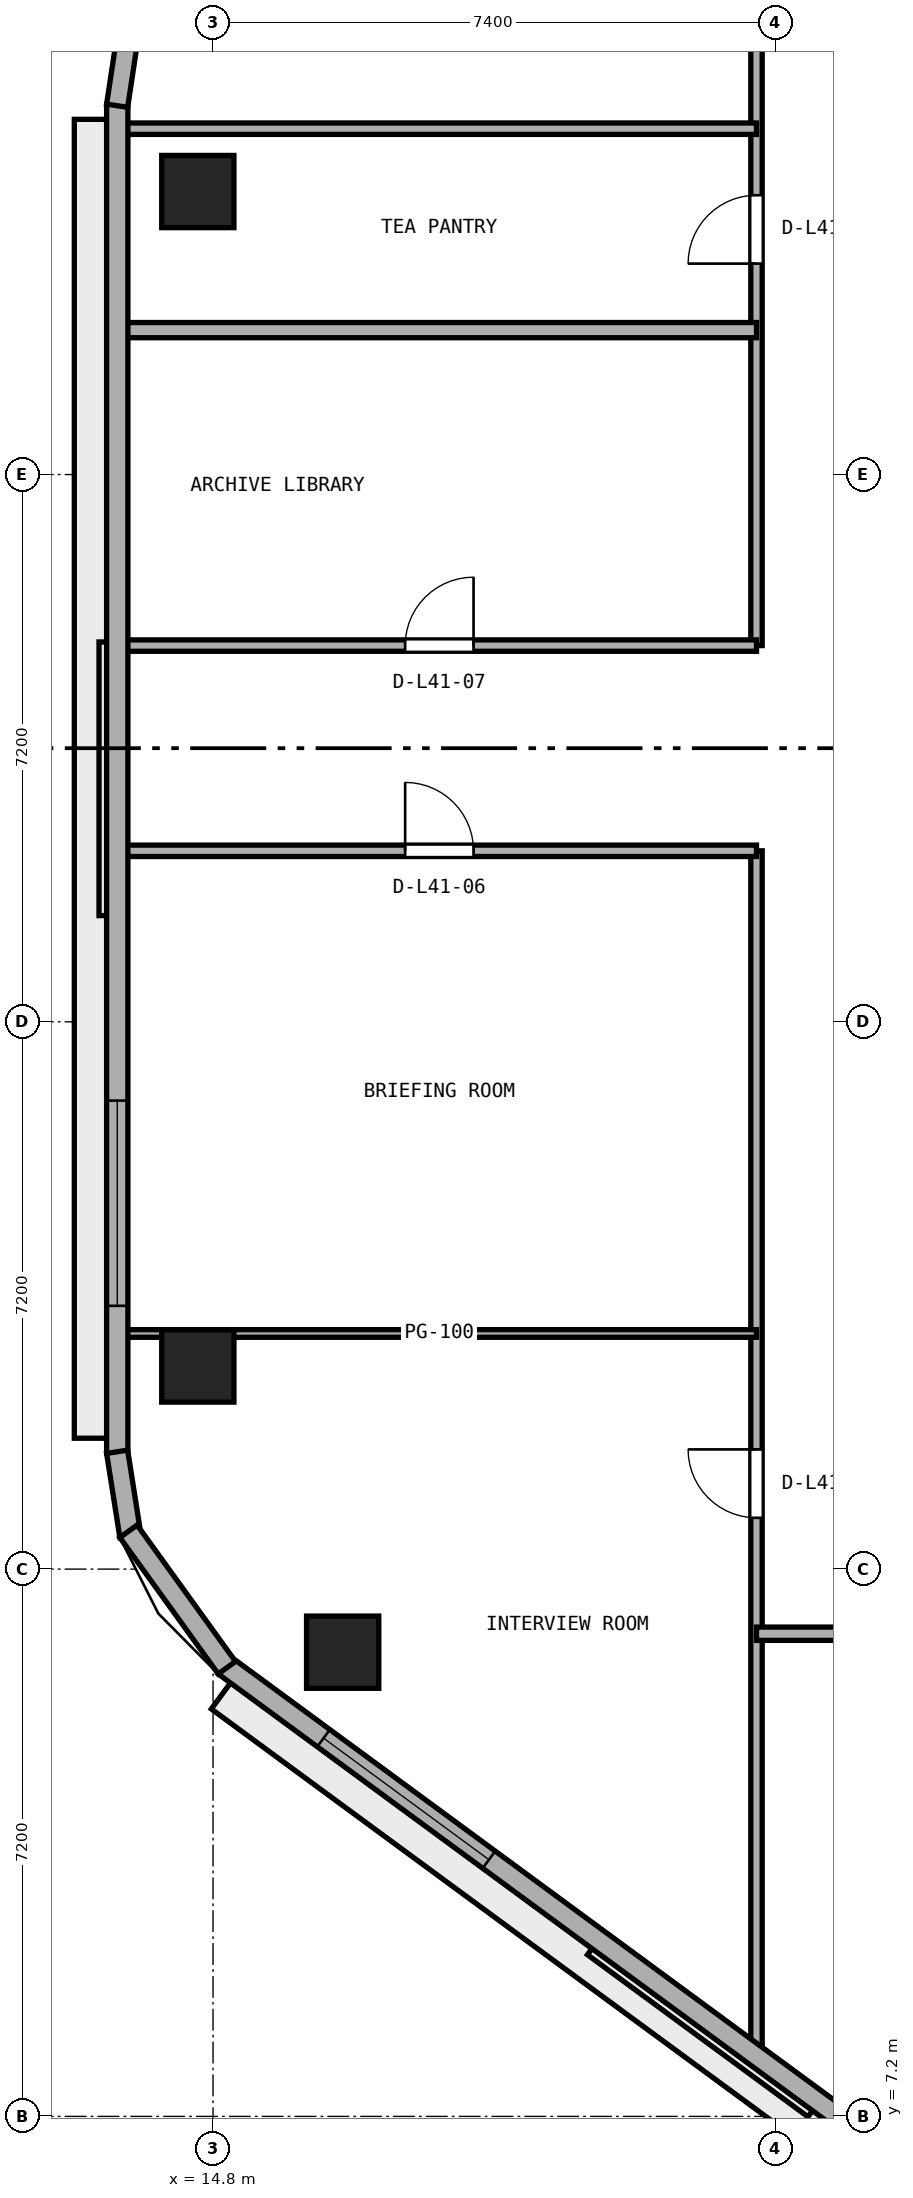
"""IFC4 building model, lengths in metres.
Left out: names, types, materials, properties, quantities, classifications, styles, units other than length and angle.
Written with IfcOpenShell. Run it as: python <this file> out.ifc"""

import sys

from ifc_helpers import new_model, si_unit, direction, frame, frame_2d, origin, origin_2d, place, context, subcontext, project, spatial, rectangle, extrude, element, fill, save


model = new_model("IFC4")
c1 = context("Model", 3, precision=1e-05, world=origin(), true_north=direction((0.0, 1.0)))
c2 = subcontext(c1, "Body", "Model", "MODEL_VIEW")
j1 = project(units=[si_unit("LENGTHUNIT", "METRE"), si_unit("PLANEANGLEUNIT", "RADIAN")], contexts=[c1])
p1 = place(None, origin())
s1 = spatial("IfcSite", under=j1, at=p1, CompositionType="ELEMENT")
p2 = place(p1, origin())
s2 = spatial("IfcBuilding", under=s1, at=p2, CompositionType="ELEMENT")
p3 = place(p2, frame((0.0, 0.0, 163.0)))
s3 = spatial("IfcBuildingStorey", under=s2, at=p3, CompositionType="ELEMENT", Elevation=163.0)
for number, where, z_axis, x_axis in (
    (1, (14.6, 32.523, 0.0), (0.0, 0.0, 1.0), (1.0, 0.0, 0.0)),
    (2, (14.6, 17.072, 0.0), (0.0, 0.0, 1.0), (1.0, 0.0, 0.0)),
    (3, (16.505, 13.307, 0.0), (0.0, 0.0, 1.0), (1.0, 0.0, 0.0)),
):
    element("IfcColumn", number, at=place(p3, frame(where, z_axis=z_axis, x_axis=x_axis)), inside=s3, PredefinedType="COLUMN", context=c2, shape_type="SweptSolid", body=[
        extrude(rectangle(XDim=0.95, YDim=0.95, at=origin_2d()), origin(), (0.0, 0.0, 1.0), 3.8),
    ])
p4 = place(p3, frame((21.95, 7.957, 0.0), z_axis=(0.0, 0.0, 1.0), x_axis=(0.0, 1.0, 0.0)))
e4 = element("IfcWall", 4, at=p4, inside=s3, PredefinedType="PARTITIONING", context=c2, shape_type="SweptSolid", body=[
    extrude(rectangle(XDim=15.894, YDim=0.15, at=frame_2d((7.947, 0.0))), origin(), (0.0, 0.0, 1.0), 3.54),
])
p5 = place(p4, frame((7.118, 0.0, 0.0)))
e5 = element("IfcOpeningElement", 5, at=p5, cuts=e4, PredefinedType="OPENING", context=c2, shape_type="SweptSolid", body=[
    extrude(rectangle(XDim=0.9, YDim=2.1, at=frame_2d((0.45, 1.05))), frame((0.0, 0.085, 0.0), z_axis=(0.0, -1.0, 0.0), x_axis=(1.0, 0.0, 0.0)), (0.0, 0.0, 1.0), 0.17),
])
p6 = place(p3, frame((21.95, 26.55, 0.0), z_axis=(0.0, 0.0, 1.0), x_axis=(0.0, 1.0, 0.0)))
e6 = element("IfcWall", 6, at=p6, inside=s3, PredefinedType="PARTITIONING", context=c2, shape_type="SweptSolid", body=[
    extrude(rectangle(XDim=10.3, YDim=0.15, at=frame_2d((5.15, 0.0))), origin(), (0.0, 0.0, 1.0), 3.54),
])
p7 = place(p6, frame((5.025, 0.0, 0.0)))
e7 = element("IfcOpeningElement", 7, at=p7, cuts=e6, PredefinedType="OPENING", context=c2, shape_type="SweptSolid", body=[
    extrude(rectangle(XDim=0.9, YDim=2.1, at=frame_2d((0.45, 1.05))), frame((0.0, 0.085, 0.0), z_axis=(0.0, -1.0, 0.0), x_axis=(1.0, 0.0, 0.0)), (0.0, 0.0, 1.0), 0.17),
])
p8 = place(p3, frame((21.95, 13.55, 0.0), z_axis=(0.0, 0.0, 1.0), x_axis=(1.0, 0.0, 0.0)))
e8 = element("IfcWall", 8, at=p8, inside=s3, PredefinedType="PARTITIONING", context=c2, shape_type="SweptSolid", body=[
    extrude(rectangle(XDim=30.1, YDim=0.175, at=frame_2d((15.05, 0.0))), origin(), (0.0, 0.0, 1.0), 3.54),
])
p9 = place(p8, frame((10.645, 0.0, 0.0)))
e9 = element("IfcOpeningElement", 9, at=p9, cuts=e8, PredefinedType="OPENING", context=c2, shape_type="SweptSolid", body=[
    extrude(rectangle(XDim=0.9, YDim=2.1, at=frame_2d((0.45, 1.05))), frame((0.0, 0.097, 0.0), z_axis=(0.0, -1.0, 0.0), x_axis=(1.0, 0.0, 0.0)), (0.0, 0.0, 1.0), 0.195),
])
p10 = place(p8, frame((25.455, 0.0, 0.0)))
e10 = element("IfcOpeningElement", 10, at=p10, cuts=e8, PredefinedType="OPENING", context=c2, shape_type="SweptSolid", body=[
    extrude(rectangle(XDim=0.9, YDim=2.1, at=frame_2d((0.45, 1.05))), frame((0.0, 0.097, 0.0), z_axis=(0.0, -1.0, 0.0), x_axis=(1.0, 0.0, 0.0)), (0.0, 0.0, 1.0), 0.195),
])
p11 = place(p3, frame((13.605, 17.5, 0.0), z_axis=(0.0, 0.0, 1.0), x_axis=(1.0, 0.0, 0.0)))
e11 = element("IfcWall", 11, at=p11, inside=s3, PredefinedType="PARTITIONING", context=c2, shape_type="SweptSolid", body=[
    extrude(rectangle(XDim=8.345, YDim=0.1, at=frame_2d((4.172, 0.0))), origin(), (0.0, 0.0, 1.0), 2.923),
])
p12 = place(p3, frame((13.605, 23.85, 0.0), z_axis=(0.0, 0.0, 1.0), x_axis=(1.0, 0.0, 0.0)))
e12 = element("IfcWall", 12, at=p12, inside=s3, PredefinedType="PARTITIONING", context=c2, shape_type="SweptSolid", body=[
    extrude(rectangle(XDim=8.345, YDim=0.15, at=frame_2d((4.172, 0.0))), origin(), (0.0, 0.0, 1.0), 3.54),
])
p13 = place(p12, frame((3.722, 0.0, 0.0)))
e13 = element("IfcOpeningElement", 13, at=p13, cuts=e12, PredefinedType="OPENING", context=c2, shape_type="SweptSolid", body=[
    extrude(rectangle(XDim=0.9, YDim=2.1, at=frame_2d((0.45, 1.05))), frame((0.0, 0.085, 0.0), z_axis=(0.0, -1.0, 0.0), x_axis=(1.0, 0.0, 0.0)), (0.0, 0.0, 1.0), 0.17),
])
p14 = place(p3, frame((13.605, 26.55, 0.0), z_axis=(0.0, 0.0, 1.0), x_axis=(1.0, 0.0, 0.0)))
e14 = element("IfcWall", 14, at=p14, inside=s3, PredefinedType="PARTITIONING", context=c2, shape_type="SweptSolid", body=[
    extrude(rectangle(XDim=8.345, YDim=0.15, at=frame_2d((4.172, 0.0))), origin(), (0.0, 0.0, 1.0), 3.54),
])
p15 = place(p14, frame((3.722, 0.0, 0.0)))
e15 = element("IfcOpeningElement", 15, at=p15, cuts=e14, PredefinedType="OPENING", context=c2, shape_type="SweptSolid", body=[
    extrude(rectangle(XDim=0.9, YDim=2.1, at=frame_2d((0.45, 1.05))), frame((0.0, 0.085, 0.0), z_axis=(0.0, -1.0, 0.0), x_axis=(1.0, 0.0, 0.0)), (0.0, 0.0, 1.0), 0.17),
])
p16 = place(p3, frame((13.605, 30.7, 0.0), z_axis=(0.0, 0.0, 1.0), x_axis=(1.0, 0.0, 0.0)))
e16 = element("IfcWall", 16, at=p16, inside=s3, PredefinedType="PARTITIONING", context=c2, shape_type="SweptSolid", body=[
    extrude(rectangle(XDim=8.345, YDim=0.2, at=frame_2d((4.172, 0.0))), origin(), (0.0, 0.0, 1.0), 3.54),
])
p17 = place(p3, frame((13.605, 33.35, 0.0), z_axis=(0.0, 0.0, 1.0), x_axis=(1.0, 0.0, 0.0)))
e17 = element("IfcWall", 17, at=p17, inside=s3, PredefinedType="PARTITIONING", context=c2, shape_type="SweptSolid", body=[
    extrude(rectangle(XDim=8.345, YDim=0.15, at=frame_2d((4.172, 0.0))), origin(), (0.0, 0.0, 1.0), 3.54),
])
p18 = place(p3, frame((13.54, 33.673, 0.0), z_axis=(0.0, 0.0, 1.0), x_axis=(0.0, -1.0, 0.0)))
e18 = element("IfcWall", 18, at=p18, inside=s3, PredefinedType="STANDARD", context=c2, shape_type="SweptSolid", body=[
    extrude(rectangle(XDim=17.751, YDim=0.28, at=frame_2d((8.875, 0.0))), origin(), (0.0, 0.0, 1.0), 3.54),
])
p19 = place(p18, frame((13.109, 0.0, 0.9)))
e19 = element("IfcOpeningElement", 19, at=p19, cuts=e18, PredefinedType="OPENING", context=c2, shape_type="SweptSolid", body=[
    extrude(rectangle(XDim=2.7, YDim=1.75, at=frame_2d((1.35, 0.875))), frame((0.0, 0.15, 0.0), z_axis=(0.0, -1.0, 0.0), x_axis=(1.0, 0.0, 0.0)), (0.0, 0.0, 1.0), 0.3),
])
p20 = place(p3, frame((14.951, 13.134, 0.0), z_axis=(0.0, 0.0, 1.0), x_axis=(0.805804940328, -0.592181051827, 0.0)))
e20 = element("IfcWall", 20, at=p20, inside=s3, PredefinedType="STANDARD", context=c2, shape_type="SweptSolid", body=[
    extrude(rectangle(XDim=15.804, YDim=0.28, at=frame_2d((7.902, 0.0))), origin(), (0.0, 0.0, 1.0), 3.54),
])
p21 = place(p20, frame((1.617, 0.0, 0.9)))
e21 = element("IfcOpeningElement", 21, at=p21, cuts=e20, PredefinedType="OPENING", context=c2, shape_type="SweptSolid", body=[
    extrude(rectangle(XDim=2.7, YDim=1.75, at=frame_2d((1.35, 0.875))), frame((0.0, 0.15, 0.0), z_axis=(0.0, -1.0, 0.0), x_axis=(1.0, 0.0, 0.0)), (0.0, 0.0, 1.0), 0.3),
])
p22 = place(p20, frame((11.487, 0.0, 0.9)))
e22 = element("IfcOpeningElement", 22, at=p22, cuts=e20, PredefinedType="OPENING", context=c2, shape_type="SweptSolid", body=[
    extrude(rectangle(XDim=2.7, YDim=1.75, at=frame_2d((1.35, 0.875))), frame((0.0, 0.15, 0.0), z_axis=(0.0, -1.0, 0.0), x_axis=(1.0, 0.0, 0.0)), (0.0, 0.0, 1.0), 0.3),
])
p23 = place(p3, frame((13.699, 34.716, 0.0), z_axis=(0.0, 0.0, 1.0), x_axis=(-0.149549920187, -0.988754176412, 0.0)))
e23 = element("IfcWall", 23, at=p23, inside=s3, PredefinedType="STANDARD", context=c2, shape_type="SweptSolid", body=[
    extrude(rectangle(XDim=1.076, YDim=0.28, at=frame_2d((0.538, 0.0))), origin(), (0.0, 0.0, 1.0), 3.54),
])
p24 = place(p3, frame((13.538, 15.944, 0.0), z_axis=(0.0, 0.0, 1.0), x_axis=(0.155447556013, -0.987844146275, 0.0)))
e24 = element("IfcWall", 24, at=p24, inside=s3, PredefinedType="STANDARD", context=c2, shape_type="SweptSolid", body=[
    extrude(rectangle(XDim=1.12, YDim=0.28, at=frame_2d((0.56, 0.0))), origin(), (0.0, 0.0, 1.0), 3.54),
])
p25 = place(p3, frame((13.688, 14.898, 0.0), z_axis=(0.0, 0.0, 1.0), x_axis=(0.584833657716, -0.811153248655, 0.0)))
e25 = element("IfcWall", 25, at=p25, inside=s3, PredefinedType="STANDARD", context=c2, shape_type="SweptSolid", body=[
    extrude(rectangle(XDim=2.212, YDim=0.28, at=frame_2d((1.106, 0.0))), origin(), (0.0, 0.0, 1.0), 3.54),
])
p26 = place(p5, origin())
e26 = element("IfcDoor", 26, at=p26, inside=s3, OperationType="SINGLE_SWING_RIGHT", PredefinedType="DOOR", context=c2, shape_type="SweptSolid", body=[
    extrude(rectangle(XDim=0.9, YDim=2.1, at=frame_2d((0.45, 1.05))), frame((0.0, 0.025, 0.0), z_axis=(0.0, -1.0, 0.0), x_axis=(1.0, 0.0, 0.0)), (0.0, 0.0, 1.0), 0.05),
])
fill(e5, e26)
p27 = place(p13, origin())
e27 = element("IfcDoor", 27, at=p27, inside=s3, OperationType="SINGLE_SWING_LEFT", PredefinedType="DOOR", context=c2, shape_type="SweptSolid", body=[
    extrude(rectangle(XDim=0.9, YDim=2.1, at=frame_2d((0.45, 1.05))), frame((0.0, 0.025, 0.0), z_axis=(0.0, -1.0, 0.0), x_axis=(1.0, 0.0, 0.0)), (0.0, 0.0, 1.0), 0.05),
])
fill(e13, e27)
p28 = place(p15, origin())
e28 = element("IfcDoor", 28, at=p28, inside=s3, OperationType="SINGLE_SWING_RIGHT", PredefinedType="DOOR", context=c2, shape_type="SweptSolid", body=[
    extrude(rectangle(XDim=0.9, YDim=2.1, at=frame_2d((0.45, 1.05))), frame((0.0, 0.025, 0.0), z_axis=(0.0, -1.0, 0.0), x_axis=(1.0, 0.0, 0.0)), (0.0, 0.0, 1.0), 0.05),
])
fill(e15, e28)
p29 = place(p7, origin())
e29 = element("IfcDoor", 29, at=p29, inside=s3, OperationType="SINGLE_SWING_LEFT", PredefinedType="DOOR", context=c2, shape_type="SweptSolid", body=[
    extrude(rectangle(XDim=0.9, YDim=2.1, at=frame_2d((0.45, 1.05))), frame((0.0, 0.025, 0.0), z_axis=(0.0, -1.0, 0.0), x_axis=(1.0, 0.0, 0.0)), (0.0, 0.0, 1.0), 0.05),
])
fill(e7, e29)
p30 = place(p19, origin())
e30 = element("IfcWindow", 30, at=p30, inside=s3, PartitioningType="SINGLE_PANEL", PredefinedType="WINDOW", context=c2, shape_type="SweptSolid", body=[
    extrude(rectangle(XDim=2.7, YDim=1.75, at=frame_2d((1.35, 0.875))), frame((0.0, 0.03, 0.0), z_axis=(0.0, -1.0, 0.0), x_axis=(1.0, 0.0, 0.0)), (0.0, 0.0, 1.0), 0.06),
])
fill(e19, e30)
p31 = place(p21, origin())
e31 = element("IfcWindow", 31, at=p31, inside=s3, PartitioningType="SINGLE_PANEL", PredefinedType="WINDOW", context=c2, shape_type="SweptSolid", body=[
    extrude(rectangle(XDim=2.7, YDim=1.75, at=frame_2d((1.35, 0.875))), frame((0.0, 0.03, 0.0), z_axis=(0.0, -1.0, 0.0), x_axis=(1.0, 0.0, 0.0)), (0.0, 0.0, 1.0), 0.06),
])
fill(e21, e31)
save(model, sys.argv[1])
